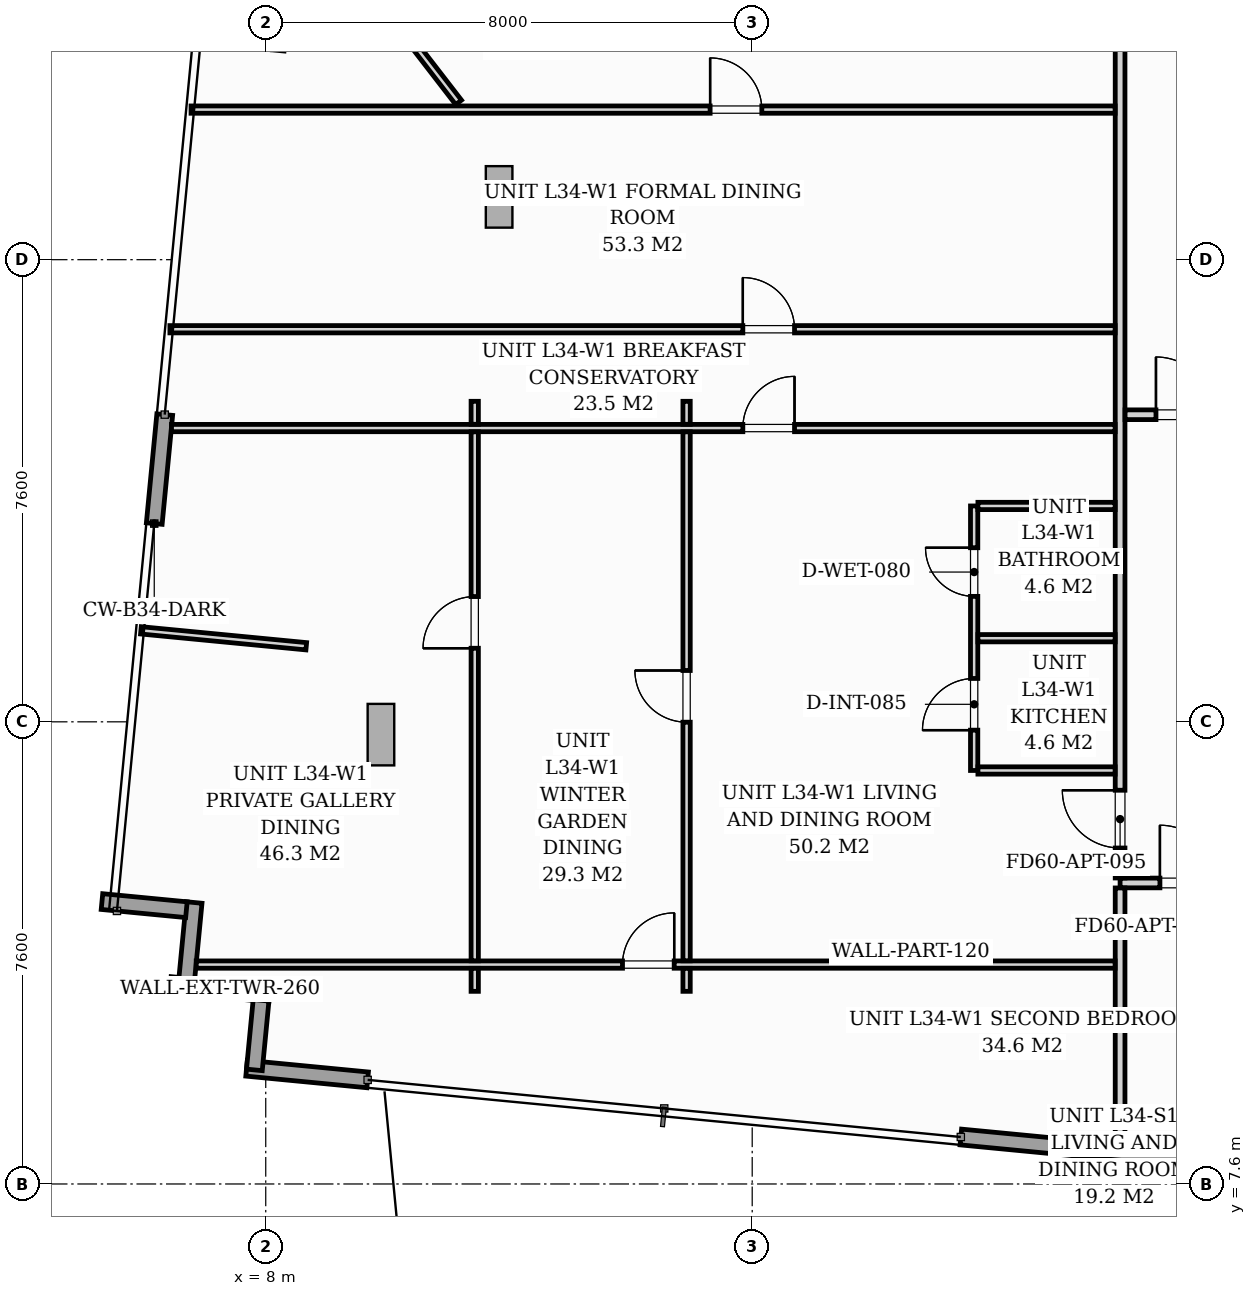
"""IFC4 building model, lengths in metres.
Left out: names, types, materials, properties, quantities, classifications, styles, units other than length and angle.
Written with IfcOpenShell. Run it as: python <this file> out.ifc"""

import sys

from ifc_helpers import new_model, si_unit, direction, frame, frame_2d, origin, origin_2d, place, context, subcontext, project, spatial, rectangle, i_section, extrude, source, transform, mapped, element, fill, save


model = new_model("IFC4")
c1 = context("Model", 3, precision=1e-05, world=origin(), true_north=direction((0.0, 1.0)))
c2 = subcontext(c1, "Body", "Model", "MODEL_VIEW")
j1 = project(units=[si_unit("LENGTHUNIT", "METRE"), si_unit("PLANEANGLEUNIT", "RADIAN")], contexts=[c1])
p1 = place(None, origin())
s1 = spatial("IfcSite", under=j1, at=p1, CompositionType="ELEMENT")
p2 = place(p1, origin())
s2 = spatial("IfcBuilding", under=s1, at=p2, CompositionType="ELEMENT")
p3 = place(p2, frame((0.0, 0.0, 119.4)))
s3 = spatial("IfcBuildingStorey", under=s2, at=p3, CompositionType="ELEMENT", Elevation=119.4)
m1 = source(origin(), c2, "Body", "SweptSolid", [
    extrude(i_section(OverallWidth=0.438, OverallDepth=1.011, WebThickness=0.041, FlangeThickness=0.074, FilletRadius=0.024, at=origin_2d()), origin(), (0.0, 0.0, 1.0), 8.12),
])
p4 = place(p3, frame((13.758, 5.232, 0.196), z_axis=(-0.574945978653, 0.614334077808, 0.540398706952), x_axis=(0.369261600973, -0.394558782087, 0.841409078585)))
e1 = element("IfcColumn", 1, at=p4, inside=s3, PredefinedType="COLUMN", context=c2, shape_type="MappedRepresentation", body=[
    mapped(m1, transform((0.0, 0.0, 0.0), scale=1.0)),
])
m2 = source(origin(), c2, "Body", "SweptSolid", [
    extrude(i_section(OverallWidth=0.438, OverallDepth=1.011, WebThickness=0.041, FlangeThickness=0.074, FilletRadius=0.024, at=origin_2d()), origin(), (0.0, 0.0, 1.0), 7.983),
])
p5 = place(p3, frame((26.738, 6.39, 0.195), z_axis=(-0.756952163782, 0.352832496204, 0.55002968226), x_axis=(0.498531518624, -0.232376798124, 0.835145106333)))
e2 = element("IfcColumn", 2, at=p5, inside=s3, PredefinedType="COLUMN", context=c2, shape_type="MappedRepresentation", body=[
    mapped(m2, transform((0.0, 0.0, 0.0), scale=1.0)),
])
m3 = source(origin(), c2, "Body", "SweptSolid", [
    extrude(i_section(OverallWidth=0.438, OverallDepth=1.011, WebThickness=0.041, FlangeThickness=0.074, FilletRadius=0.024, at=origin_2d()), origin(), (0.0, 0.0, 1.0), 6.635),
])
p6 = place(p3, frame((12.212, 22.752, 0.175), z_axis=(-0.243413874896, 0.703453219409, 0.66775987721), x_axis=(0.218359881802, -0.631048504974, 0.744376750301)))
e3 = element("IfcColumn", 3, at=p6, inside=s3, PredefinedType="COLUMN", context=c2, shape_type="MappedRepresentation", body=[
    mapped(m3, transform((0.0, 0.0, 0.0), scale=1.0)),
])
m4 = source(origin(), c2, "Body", "SweptSolid", [
    extrude(i_section(OverallWidth=0.438, OverallDepth=1.011, WebThickness=0.041, FlangeThickness=0.074, FilletRadius=0.024, at=origin_2d()), origin(), (0.0, 0.0, 1.0), 5.536),
])
p7 = place(p3, frame((25.221, 25.412, 0.139), z_axis=(-0.550407983816, 0.189202744437, 0.813174872244), x_axis=(0.769008579573, -0.264346699228, 0.582019438809)))
e4 = element("IfcColumn", 4, at=p7, inside=s3, PredefinedType="COLUMN", context=c2, shape_type="MappedRepresentation", body=[
    mapped(m4, transform((0.0, 0.0, 0.0), scale=1.0)),
])
m5 = source(origin(), c2, "Body", "SweptSolid", [
    extrude(i_section(OverallWidth=0.438, OverallDepth=1.011, WebThickness=0.041, FlangeThickness=0.074, FilletRadius=0.024, at=origin_2d()), origin(), (0.0, 0.0, 1.0), 7.53),
])
p8 = place(p3, frame((10.616, 13.786, 0.19), z_axis=(-0.417403538964, 0.695845483396, 0.584442767855), x_axis=(0.300638374798, -0.501188503955, 0.811434933376)))
e5 = element("IfcColumn", 5, at=p8, inside=s3, PredefinedType="COLUMN", context=c2, shape_type="MappedRepresentation", body=[
    mapped(m5, transform((0.0, 0.0, 0.0), scale=1.0)),
])
p9 = place(p3, frame((8.064, 10.723, 0.0), z_axis=(0.0, 0.0, 1.0), x_axis=(-0.995394563142, 0.095862733462, 0.0)))
e6 = element("IfcWall", 6, at=p9, inside=s3, PredefinedType="STANDARD", context=c2, shape_type="SweptSolid", body=[
    extrude(rectangle(XDim=1.64, YDim=0.26, at=frame_2d((0.82, 0.0))), origin(), (0.0, 0.0, 1.0), 4.78),
])
p10 = place(p3, frame((6.688, 10.84, 0.0), z_axis=(0.0, 0.0, 1.0), x_axis=(0.09589913835, 0.995391056452, 0.0)))
e7 = element("IfcWall", 7, at=p10, inside=s3, PredefinedType="STANDARD", context=c2, shape_type="SweptSolid", body=[
    extrude(rectangle(XDim=1.395, YDim=0.26, at=frame_2d((0.698, 0.0))), origin(), (0.0, 0.0, 1.0), 4.78),
])
p11 = place(p3, frame((6.695, 12.111, 0.0), z_axis=(0.0, 0.0, 1.0), x_axis=(-0.99540614245, 0.095742423056, 0.0)))
e8 = element("IfcWall", 8, at=p11, inside=s3, PredefinedType="STANDARD", context=c2, shape_type="SweptSolid", body=[
    extrude(rectangle(XDim=1.395, YDim=0.26, at=frame_2d((0.697, 0.0))), origin(), (0.0, 0.0, 1.0), 4.78),
])
p12 = place(p3, frame((6.167, 18.46, 0.0), z_axis=(0.0, 0.0, 1.0), x_axis=(0.09589072759, 0.995391866735, 0.0)))
e9 = element("IfcWall", 9, at=p12, inside=s3, PredefinedType="STANDARD", context=c2, shape_type="SweptSolid", body=[
    extrude(rectangle(XDim=1.8, YDim=0.26, at=frame_2d((0.9, 0.0))), origin(), (0.0, 0.0, 1.0), 4.78),
])
p13 = place(p3, frame((24.627, 7.872, 0.0), z_axis=(0.0, 0.0, 1.0), x_axis=(-0.995397625271, 0.095830932396, 0.0)))
e10 = element("IfcWall", 10, at=p13, inside=s3, PredefinedType="STANDARD", context=c2, shape_type="SweptSolid", body=[
    extrude(rectangle(XDim=5.22, YDim=0.26, at=frame_2d((2.61, 0.0))), origin(), (0.0, 0.0, 1.0), 4.78),
])
p14 = place(p3, frame((9.676, 9.312, 0.0), z_axis=(0.0, 0.0, 1.0), x_axis=(-0.995397839199, 0.095828710298, 0.0)))
e11 = element("IfcWall", 11, at=p14, inside=s3, PredefinedType="STANDARD", context=c2, shape_type="SweptSolid", body=[
    extrude(rectangle(XDim=2.0, YDim=0.26, at=frame_2d((1.0, 0.0))), origin(), (0.0, 0.0, 1.0), 4.78),
])
p15 = place(p3, frame((7.813, 9.476, 0.0), z_axis=(0.0, 0.0, 1.0), x_axis=(0.09576095695, 0.995404359607, 0.0)))
e12 = element("IfcWall", 12, at=p15, inside=s3, PredefinedType="STANDARD", context=c2, shape_type="SweptSolid", body=[
    extrude(rectangle(XDim=1.15, YDim=0.26, at=frame_2d((0.575, 0.0))), origin(), (0.0, 0.0, 1.0), 4.78),
])
p16 = place(p3, frame((22.05, 12.55, 0.0), z_axis=(0.0, 0.0, 1.0), x_axis=(1.0, 0.0, 0.0)))
e13 = element("IfcWall", 13, at=p16, inside=s3, PredefinedType="PARTITIONING", context=c2, shape_type="SweptSolid", body=[
    extrude(rectangle(XDim=23.83, YDim=0.16, at=frame_2d((11.915, 0.0))), origin(), (0.0, 0.0, 1.0), 4.78),
])
p17 = place(p16, frame((0.655, 0.0, 0.0)))
e14 = element("IfcOpeningElement", 14, at=p17, cuts=e13, PredefinedType="OPENING", context=c2, shape_type="SweptSolid", body=[
    extrude(rectangle(XDim=0.95, YDim=2.06, at=frame_2d((0.475, 1.03))), frame((0.0, 0.09, 0.0), z_axis=(0.0, -1.0, 0.0), x_axis=(1.0, 0.0, 0.0)), (0.0, 0.0, 1.0), 0.18),
])
p18 = place(p16, frame((12.04, 0.0, 0.0)))
e15 = element("IfcOpeningElement", 15, at=p18, cuts=e13, PredefinedType="OPENING", context=c2, shape_type="SweptSolid", body=[
    extrude(rectangle(XDim=0.95, YDim=2.06, at=frame_2d((0.475, 1.03))), frame((0.0, 0.09, 0.0), z_axis=(0.0, -1.0, 0.0), x_axis=(1.0, 0.0, 0.0)), (0.0, 0.0, 1.0), 0.18),
])
p19 = place(p3, frame((22.05, 8.253, 0.0), z_axis=(0.0, 0.0, 1.0), x_axis=(0.0, 1.0, 0.0)))
e16 = element("IfcWall", 16, at=p19, inside=s3, PredefinedType="PARTITIONING", context=c2, shape_type="SweptSolid", body=[
    extrude(rectangle(XDim=4.215, YDim=0.16, at=frame_2d((2.107, 0.0))), origin(), (0.0, 0.0, 1.0), 4.78),
])
p20 = place(p3, frame((22.05, 12.632, 0.0), z_axis=(0.0, 0.0, 1.0), x_axis=(0.0, 1.0, 0.0)))
e17 = element("IfcWall", 17, at=p20, inside=s3, PredefinedType="PARTITIONING", context=c2, shape_type="SweptSolid", body=[
    extrude(rectangle(XDim=14.785, YDim=0.16, at=frame_2d((7.393, 0.0))), origin(), (0.0, 0.0, 1.0), 4.78),
])
p21 = place(p20, frame((0.493, 0.0, 0.0)))
e18 = element("IfcOpeningElement", 18, at=p21, cuts=e17, PredefinedType="OPENING", context=c2, shape_type="SweptSolid", body=[
    extrude(rectangle(XDim=0.95, YDim=2.06, at=frame_2d((0.475, 1.03))), frame((0.0, 0.09, 0.0), z_axis=(0.0, -1.0, 0.0), x_axis=(1.0, 0.0, 0.0)), (0.0, 0.0, 1.0), 0.18),
])
p22 = place(p3, frame((19.65, 14.4, 0.0), z_axis=(0.0, 0.0, 1.0), x_axis=(0.0, 1.0, 0.0)))
e19 = element("IfcWall", 19, at=p22, inside=s3, PredefinedType="PARTITIONING", context=c2, shape_type="SweptSolid", body=[
    extrude(rectangle(XDim=4.35, YDim=0.12, at=frame_2d((2.175, 0.0))), origin(), (0.0, 0.0, 1.0), 3.885),
])
p23 = place(p22, frame((0.663, 0.0, 0.0)))
e20 = element("IfcOpeningElement", 20, at=p23, cuts=e19, PredefinedType="OPENING", context=c2, shape_type="SweptSolid", body=[
    extrude(rectangle(XDim=0.85, YDim=2.05, at=frame_2d((0.425, 1.025))), frame((0.0, 0.07, 0.0), z_axis=(0.0, -1.0, 0.0), x_axis=(1.0, 0.0, 0.0)), (0.0, 0.0, 1.0), 0.14),
])
p24 = place(p22, frame((2.863, 0.0, 0.0)))
e21 = element("IfcOpeningElement", 21, at=p24, cuts=e19, PredefinedType="OPENING", context=c2, shape_type="SweptSolid", body=[
    extrude(rectangle(XDim=0.8, YDim=2.02, at=frame_2d((0.4, 1.01))), frame((0.0, 0.07, 0.0), z_axis=(0.0, -1.0, 0.0), x_axis=(1.0, 0.0, 0.0)), (0.0, 0.0, 1.0), 0.14),
])
for number, where, z_axis, x_axis in (
    (22, (19.712, 16.575, 0.0), (0.0, 0.0, 1.0), (1.0, 0.0, 0.0)),
    (23, (19.712, 14.4, 0.0), (0.0, 0.0, 1.0), (1.0, 0.0, 0.0)),
    (24, (19.712, 18.75, 0.0), (0.0, 0.0, 1.0), (1.0, 0.0, 0.0)),
):
    element("IfcWall", number, at=place(p3, frame(where, z_axis=z_axis, x_axis=x_axis)), inside=s3, PredefinedType="PARTITIONING", context=c2, shape_type="SweptSolid", body=[
        extrude(rectangle(XDim=2.256, YDim=0.12, at=frame_2d((1.128, 0.0))), origin(), (0.0, 0.0, 1.0), 4.78),
    ])
p25 = place(p3, frame((6.772, 25.268, 0.0), z_axis=(0.0, 0.0, 1.0), x_axis=(1.0, 0.0, 0.0)))
e25 = element("IfcWall", 25, at=p25, inside=s3, PredefinedType="PARTITIONING", context=c2, shape_type="SweptSolid", body=[
    extrude(rectangle(XDim=15.196, YDim=0.12, at=frame_2d((7.598, 0.0))), origin(), (0.0, 0.0, 1.0), 4.78),
])
p26 = place(p25, frame((8.536, 0.0, 0.0)))
e26 = element("IfcOpeningElement", 26, at=p26, cuts=e25, PredefinedType="OPENING", context=c2, shape_type="SweptSolid", body=[
    extrude(rectangle(XDim=0.85, YDim=2.05, at=frame_2d((0.425, 1.025))), frame((0.0, 0.07, 0.0), z_axis=(0.0, -1.0, 0.0), x_axis=(1.0, 0.0, 0.0)), (0.0, 0.0, 1.0), 0.14),
])
p27 = place(p3, frame((6.857, 11.208, 0.0), z_axis=(0.0, 0.0, 1.0), x_axis=(1.0, 0.0, 0.0)))
e27 = element("IfcWall", 27, at=p27, inside=s3, PredefinedType="PARTITIONING", context=c2, shape_type="SweptSolid", body=[
    extrude(rectangle(XDim=15.111, YDim=0.12, at=frame_2d((7.556, 0.0))), origin(), (0.0, 0.0, 1.0), 4.78),
])
p28 = place(p27, frame((7.01, 0.0, 0.0)))
e28 = element("IfcOpeningElement", 28, at=p28, cuts=e27, PredefinedType="OPENING", context=c2, shape_type="SweptSolid", body=[
    extrude(rectangle(XDim=0.85, YDim=2.05, at=frame_2d((0.425, 1.025))), frame((0.0, 0.07, 0.0), z_axis=(0.0, -1.0, 0.0), x_axis=(1.0, 0.0, 0.0)), (0.0, 0.0, 1.0), 0.14),
])
p29 = place(p3, frame((6.424, 21.656, 0.0), z_axis=(0.0, 0.0, 1.0), x_axis=(1.0, 0.0, 0.0)))
e29 = element("IfcWall", 29, at=p29, inside=s3, PredefinedType="PARTITIONING", context=c2, shape_type="SweptSolid", body=[
    extrude(rectangle(XDim=15.544, YDim=0.12, at=frame_2d((7.772, 0.0))), origin(), (0.0, 0.0, 1.0), 4.78),
])
p30 = place(p29, frame((9.422, 0.0, 0.0)))
e30 = element("IfcOpeningElement", 30, at=p30, cuts=e29, PredefinedType="OPENING", context=c2, shape_type="SweptSolid", body=[
    extrude(rectangle(XDim=0.85, YDim=2.05, at=frame_2d((0.425, 1.025))), frame((0.0, 0.07, 0.0), z_axis=(0.0, -1.0, 0.0), x_axis=(1.0, 0.0, 0.0)), (0.0, 0.0, 1.0), 0.14),
])
p31 = place(p3, frame((6.45, 20.031, 0.0), z_axis=(0.0, 0.0, 1.0), x_axis=(1.0, 0.0, 0.0)))
e31 = element("IfcWall", 31, at=p31, inside=s3, PredefinedType="PARTITIONING", context=c2, shape_type="SweptSolid", body=[
    extrude(rectangle(XDim=15.518, YDim=0.12, at=frame_2d((7.759, 0.0))), origin(), (0.0, 0.0, 1.0), 4.78),
])
p32 = place(p31, frame((9.396, 0.0, 0.0)))
e32 = element("IfcOpeningElement", 32, at=p32, cuts=e31, PredefinedType="OPENING", context=c2, shape_type="SweptSolid", body=[
    extrude(rectangle(XDim=0.85, YDim=2.05, at=frame_2d((0.425, 1.025))), frame((0.0, 0.07, 0.0), z_axis=(0.0, -1.0, 0.0), x_axis=(1.0, 0.0, 0.0)), (0.0, 0.0, 1.0), 0.14),
])
p33 = place(p3, frame((11.437, 10.768, 0.0), z_axis=(0.0, 0.0, 1.0), x_axis=(0.0, 1.0, 0.0)))
e33 = element("IfcWall", 33, at=p33, inside=s3, PredefinedType="PARTITIONING", context=c2, shape_type="SweptSolid", body=[
    extrude(rectangle(XDim=0.378, YDim=0.12, at=frame_2d((0.189, 0.0))), origin(), (0.0, 0.0, 1.0), 4.78),
])
p34 = place(p3, frame((11.437, 11.27, 0.0), z_axis=(0.0, 0.0, 1.0), x_axis=(0.0, 1.0, 0.0)))
e34 = element("IfcWall", 34, at=p34, inside=s3, PredefinedType="PARTITIONING", context=c2, shape_type="SweptSolid", body=[
    extrude(rectangle(XDim=8.699, YDim=0.12, at=frame_2d((4.35, 0.0))), origin(), (0.0, 0.0, 1.0), 4.78),
])
p35 = place(p34, frame((5.14, 0.0, 0.0)))
e35 = element("IfcOpeningElement", 35, at=p35, cuts=e34, PredefinedType="OPENING", context=c2, shape_type="SweptSolid", body=[
    extrude(rectangle(XDim=0.85, YDim=2.05, at=frame_2d((0.425, 1.025))), frame((0.0, 0.07, 0.0), z_axis=(0.0, -1.0, 0.0), x_axis=(1.0, 0.0, 0.0)), (0.0, 0.0, 1.0), 0.14),
])
for number, where, z_axis, x_axis in (
    (36, (11.437, 20.093, 0.0), (0.0, 0.0, 1.0), (0.0, 1.0, 0.0)),
    (37, (14.921, 10.768, 0.0), (0.0, 0.0, 1.0), (0.0, 1.0, 0.0)),
):
    element("IfcWall", number, at=place(p3, frame(where, z_axis=z_axis, x_axis=x_axis)), inside=s3, PredefinedType="PARTITIONING", context=c2, shape_type="SweptSolid", body=[
        extrude(rectangle(XDim=0.378, YDim=0.12, at=frame_2d((0.189, 0.0))), origin(), (0.0, 0.0, 1.0), 4.78),
    ])
p36 = place(p3, frame((14.921, 11.27, 0.0), z_axis=(0.0, 0.0, 1.0), x_axis=(0.0, 1.0, 0.0)))
e38 = element("IfcWall", 38, at=p36, inside=s3, PredefinedType="PARTITIONING", context=c2, shape_type="SweptSolid", body=[
    extrude(rectangle(XDim=8.699, YDim=0.12, at=frame_2d((4.35, 0.0))), origin(), (0.0, 0.0, 1.0), 4.78),
])
p37 = place(p36, frame((3.924, 0.0, 0.0)))
e39 = element("IfcOpeningElement", 39, at=p37, cuts=e38, PredefinedType="OPENING", context=c2, shape_type="SweptSolid", body=[
    extrude(rectangle(XDim=0.85, YDim=2.05, at=frame_2d((0.425, 1.025))), frame((0.0, 0.07, 0.0), z_axis=(0.0, -1.0, 0.0), x_axis=(1.0, 0.0, 0.0)), (0.0, 0.0, 1.0), 0.14),
])
p38 = place(p3, frame((14.921, 20.093, 0.0), z_axis=(0.0, 0.0, 1.0), x_axis=(0.0, 1.0, 0.0)))
e40 = element("IfcWall", 40, at=p38, inside=s3, PredefinedType="PARTITIONING", context=c2, shape_type="SweptSolid", body=[
    extrude(rectangle(XDim=0.378, YDim=0.12, at=frame_2d((0.189, 0.0))), origin(), (0.0, 0.0, 1.0), 4.78),
])
p39 = place(p3, frame((22.132, 20.25, 0.0), z_axis=(0.0, 0.0, 1.0), x_axis=(1.0, 0.0, 0.0)))
e41 = element("IfcWall", 41, at=p39, inside=s3, PredefinedType="PARTITIONING", context=c2, shape_type="SweptSolid", body=[
    extrude(rectangle(XDim=1.886, YDim=0.16, at=frame_2d((0.943, 0.0))), origin(), (0.0, 0.0, 1.0), 4.78),
])
p40 = place(p39, frame((0.508, 0.0, 0.0)))
e42 = element("IfcOpeningElement", 42, at=p40, cuts=e41, PredefinedType="OPENING", context=c2, shape_type="SweptSolid", body=[
    extrude(rectangle(XDim=0.95, YDim=2.06, at=frame_2d((0.475, 1.03))), frame((0.0, 0.09, 0.0), z_axis=(0.0, -1.0, 0.0), x_axis=(1.0, 0.0, 0.0)), (0.0, 0.0, 1.0), 0.18),
])
p41 = place(p3, frame((11.172, 25.387, 0.0), z_axis=(0.0, 0.0, 1.0), x_axis=(-0.611369296281, 0.791345426198, 0.0)))
e43 = element("IfcWall", 43, at=p41, inside=s3, PredefinedType="PARTITIONING", context=c2, shape_type="SweptSolid", body=[
    extrude(rectangle(XDim=2.488, YDim=0.12, at=frame_2d((1.244, 0.0))), origin(), (0.0, 0.0, 1.0), 4.78),
])
p42 = place(p3, frame((8.667, 16.443, 0.0), z_axis=(0.0, 0.0, 1.0), x_axis=(-0.995391656355, 0.095892911409, 0.0)))
e44 = element("IfcWall", 44, at=p42, inside=s3, PredefinedType="PARTITIONING", context=c2, shape_type="SweptSolid", body=[
    extrude(rectangle(XDim=2.732, YDim=0.12, at=frame_2d((1.366, 0.0))), origin(), (0.0, 0.0, 1.0), 4.78),
])
m6 = source(origin(), c2, "Body", "SweptSolid", [
    extrude(rectangle(XDim=0.95, YDim=2.06, at=frame_2d((0.475, 1.03))), frame((0.0, 0.025, 0.0), z_axis=(0.0, -1.0, 0.0), x_axis=(1.0, 0.0, 0.0)), (0.0, 0.0, 1.0), 0.05),
])
p43 = place(p17, origin())
e45 = element("IfcDoor", 45, at=p43, inside=s3, OperationType="SINGLE_SWING_LEFT", PredefinedType="DOOR", context=c2, shape_type="MappedRepresentation", body=[
    mapped(m6, transform((0.0, 0.0, 0.0), scale=1.0)),
])
fill(e14, e45)
p44 = place(p21, origin())
e46 = element("IfcDoor", 46, at=p44, inside=s3, OperationType="SINGLE_SWING_RIGHT", PredefinedType="DOOR", context=c2, shape_type="MappedRepresentation", body=[
    mapped(m6, transform((0.0, 0.0, 0.0), scale=1.0)),
])
fill(e18, e46)
m7 = source(origin(), c2, "Body", "SweptSolid", [
    extrude(rectangle(XDim=0.85, YDim=2.05, at=frame_2d((0.425, 1.025))), frame((0.0, 0.025, 0.0), z_axis=(0.0, -1.0, 0.0), x_axis=(1.0, 0.0, 0.0)), (0.0, 0.0, 1.0), 0.05),
])
p45 = place(p23, origin())
e47 = element("IfcDoor", 47, at=p45, inside=s3, OperationType="SINGLE_SWING_LEFT", PredefinedType="DOOR", context=c2, shape_type="MappedRepresentation", body=[
    mapped(m7, transform((0.0, 0.0, 0.0), scale=1.0)),
])
fill(e20, e47)
m8 = source(origin(), c2, "Body", "SweptSolid", [
    extrude(rectangle(XDim=0.8, YDim=2.02, at=frame_2d((0.4, 1.01))), frame((0.0, 0.025, 0.0), z_axis=(0.0, -1.0, 0.0), x_axis=(1.0, 0.0, 0.0)), (0.0, 0.0, 1.0), 0.05),
])
p46 = place(p24, origin())
e48 = element("IfcDoor", 48, at=p46, inside=s3, OperationType="SINGLE_SWING_RIGHT", PredefinedType="DOOR", context=c2, shape_type="MappedRepresentation", body=[
    mapped(m8, transform((0.0, 0.0, 0.0), scale=1.0)),
])
fill(e21, e48)
p47 = place(p26, origin())
e49 = element("IfcDoor", 49, at=p47, inside=s3, OperationType="SINGLE_SWING_LEFT", PredefinedType="DOOR", context=c2, shape_type="MappedRepresentation", body=[
    mapped(m7, transform((0.0, 0.0, 0.0), scale=1.0)),
])
fill(e26, e49)
p48 = place(p28, origin())
e50 = element("IfcDoor", 50, at=p48, inside=s3, OperationType="SINGLE_SWING_RIGHT", PredefinedType="DOOR", context=c2, shape_type="MappedRepresentation", body=[
    mapped(m7, transform((0.0, 0.0, 0.0), scale=1.0)),
])
fill(e28, e50)
p49 = place(p30, origin())
e51 = element("IfcDoor", 51, at=p49, inside=s3, OperationType="SINGLE_SWING_LEFT", PredefinedType="DOOR", context=c2, shape_type="MappedRepresentation", body=[
    mapped(m7, transform((0.0, 0.0, 0.0), scale=1.0)),
])
fill(e30, e51)
p50 = place(p32, origin())
e52 = element("IfcDoor", 52, at=p50, inside=s3, OperationType="SINGLE_SWING_RIGHT", PredefinedType="DOOR", context=c2, shape_type="MappedRepresentation", body=[
    mapped(m7, transform((0.0, 0.0, 0.0), scale=1.0)),
])
fill(e32, e52)
p51 = place(p35, origin())
e53 = element("IfcDoor", 53, at=p51, inside=s3, OperationType="SINGLE_SWING_LEFT", PredefinedType="DOOR", context=c2, shape_type="MappedRepresentation", body=[
    mapped(m7, transform((0.0, 0.0, 0.0), scale=1.0)),
])
fill(e35, e53)
p52 = place(p37, origin())
e54 = element("IfcDoor", 54, at=p52, inside=s3, OperationType="SINGLE_SWING_RIGHT", PredefinedType="DOOR", context=c2, shape_type="MappedRepresentation", body=[
    mapped(m7, transform((0.0, 0.0, 0.0), scale=1.0)),
])
fill(e39, e54)
p53 = place(p40, origin())
e55 = element("IfcDoor", 55, at=p53, inside=s3, OperationType="SINGLE_SWING_LEFT", PredefinedType="DOOR", context=c2, shape_type="MappedRepresentation", body=[
    mapped(m6, transform((0.0, 0.0, 0.0), scale=1.0)),
])
fill(e42, e55)
save(model, sys.argv[1])
